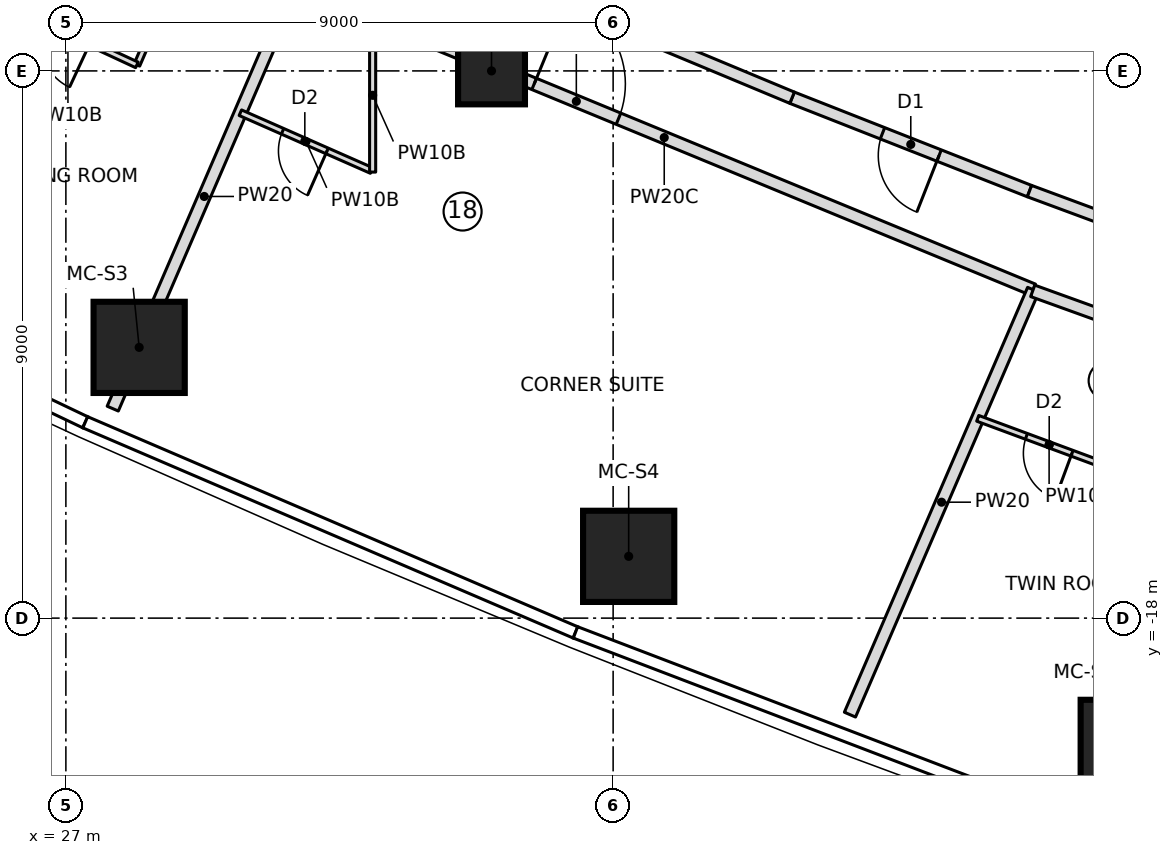
"""IFC4 building model, lengths in metres.
Left out: names, types, materials, properties, quantities, classifications, styles, units other than length and angle.
Written with IfcOpenShell. Run it as: python <this file> out.ifc"""

import sys

from ifc_helpers import new_model, si_unit, direction, frame, frame_2d, origin, origin_2d, place, context, subcontext, project, spatial, rectangle, extrude, element, fill, save


model = new_model("IFC4")
c1 = context("Model", 3, precision=1e-05, world=origin(), true_north=direction((0.0, 1.0)))
c2 = subcontext(c1, "Body", "Model", "MODEL_VIEW")
j1 = project(units=[si_unit("LENGTHUNIT", "METRE"), si_unit("PLANEANGLEUNIT", "RADIAN")], contexts=[c1])
p1 = place(None, origin())
s1 = spatial("IfcSite", under=j1, at=p1, CompositionType="ELEMENT")
p2 = place(p1, origin())
s2 = spatial("IfcBuilding", under=s1, at=p2, CompositionType="ELEMENT")
p3 = place(p2, frame((0.0, 0.0, 130.2)))
s3 = spatial("IfcBuildingStorey", under=s2, at=p3, CompositionType="ELEMENT", Elevation=130.2)
for number, where, z_axis, x_axis in (
    (1, (28.205, -13.547, 0.0), (0.0, 0.0, 1.0), (1.0, 0.0, 0.0)),
    (2, (36.256, -16.984, 0.0), (0.0, 0.0, 1.0), (1.0, 0.0, 0.0)),
    (3, (44.438, -20.093, 0.0), (0.0, 0.0, 1.0), (1.0, 0.0, 0.0)),
):
    element("IfcColumn", number, at=place(p3, frame(where, z_axis=z_axis, x_axis=x_axis)), inside=s3, PredefinedType="COLUMN", context=c2, shape_type="SweptSolid", body=[
        extrude(rectangle(XDim=1.5, YDim=1.5, at=origin_2d()), origin(), (0.0, 0.0, 1.0), 3.55),
    ])
p4 = place(p3, frame((34.0, -9.0, 0.0), z_axis=(0.0, 0.0, 1.0), x_axis=(1.0, 0.0, 0.0)))
e4 = element("IfcColumn", 4, at=p4, inside=s3, PredefinedType="COLUMN", context=c2, shape_type="SweptSolid", body=[
    extrude(rectangle(XDim=1.1, YDim=1.1, at=origin_2d()), origin(), (0.0, 0.0, 1.0), 3.55),
])
p5 = place(p3, frame((23.801, -12.716, 0.0), z_axis=(0.0, 0.0, 1.0), x_axis=(0.395995556294, 0.918252426839, 0.0)))
e5 = element("IfcWall", 5, at=p5, inside=s3, PredefinedType="PARTITIONING", context=c2, shape_type="SweptSolid", body=[
    extrude(rectangle(XDim=7.603, YDim=0.2, at=frame_2d((3.802, 0.0))), origin(), (0.0, 0.0, 1.0), 3.25),
])
p6 = place(p3, frame((29.07, -6.81, 0.0), z_axis=(0.0, 0.0, 1.0), x_axis=(-0.396000751487, -0.918250186399, 0.0)))
e6 = element("IfcWall", 6, at=p6, inside=s3, PredefinedType="PARTITIONING", context=c2, shape_type="SweptSolid", body=[
    extrude(rectangle(XDim=2.278, YDim=0.1, at=frame_2d((1.139, 0.0))), origin(), (0.0, 0.0, 1.0), 3.25),
])
p7 = place(p3, frame((28.168, -8.902, 0.0), z_axis=(0.0, 0.0, 1.0), x_axis=(-0.906813113059, 0.421532890751, 0.0)))
e7 = element("IfcWall", 7, at=p7, inside=s3, PredefinedType="PARTITIONING", context=c2, shape_type="SweptSolid", body=[
    extrude(rectangle(XDim=2.501, YDim=0.1, at=frame_2d((1.25, 0.0))), origin(), (0.0, 0.0, 1.0), 3.25),
])
p8 = place(p7, frame((0.85, 0.0, 0.0)))
e8 = element("IfcOpeningElement", 8, at=p8, cuts=e7, PredefinedType="OPENING", context=c2, shape_type="SweptSolid", body=[
    extrude(rectangle(XDim=0.8, YDim=2.1, at=frame_2d((0.4, 1.05))), frame((0.0, 0.06, 0.0), z_axis=(0.0, -1.0, 0.0), x_axis=(1.0, 0.0, 0.0)), (0.0, 0.0, 1.0), 0.12),
])
p9 = place(p3, frame((27.771, -14.554, 0.0), z_axis=(0.0, 0.0, 1.0), x_axis=(0.396004020147, 0.918248776763, 0.0)))
e9 = element("IfcWall", 9, at=p9, inside=s3, PredefinedType="PARTITIONING", context=c2, shape_type="SweptSolid", body=[
    extrude(rectangle(XDim=7.6, YDim=0.2, at=frame_2d((3.8, 0.0))), origin(), (0.0, 0.0, 1.0), 3.25),
])
p10 = place(p3, frame((30.772, -7.594, 0.0), z_axis=(0.0, 0.0, 1.0), x_axis=(0.924461873383, -0.381274500407, 0.0)))
e10 = element("IfcWall", 10, at=p10, inside=s3, PredefinedType="PARTITIONING", context=c2, shape_type="SweptSolid", body=[
    extrude(rectangle(XDim=13.127, YDim=0.2, at=frame_2d((6.564, 0.0))), origin(), (0.0, 0.0, 1.0), 3.25),
])
p11 = place(p10, frame((4.25, 0.0, 0.0)))
e11 = element("IfcOpeningElement", 11, at=p11, cuts=e10, PredefinedType="OPENING", context=c2, shape_type="SweptSolid", body=[
    extrude(rectangle(XDim=1.5, YDim=2.1, at=frame_2d((0.75, 1.05))), frame((0.0, 0.11, 0.0), z_axis=(0.0, -1.0, 0.0), x_axis=(1.0, 0.0, 0.0)), (0.0, 0.0, 1.0), 0.22),
])
p12 = place(p3, frame((32.028, -10.638, 0.0), z_axis=(0.0, 0.0, 1.0), x_axis=(-0.915108845766, 0.403206895278, 0.0)))
e12 = element("IfcWall", 12, at=p12, inside=s3, PredefinedType="PARTITIONING", context=c2, shape_type="SweptSolid", body=[
    extrude(rectangle(XDim=2.358, YDim=0.1, at=frame_2d((1.179, 0.0))), origin(), (0.0, 0.0, 1.0), 3.25),
])
p13 = place(p12, frame((0.8, 0.0, 0.0)))
e13 = element("IfcOpeningElement", 13, at=p13, cuts=e12, PredefinedType="OPENING", context=c2, shape_type="SweptSolid", body=[
    extrude(rectangle(XDim=0.8, YDim=2.1, at=frame_2d((0.4, 1.05))), frame((0.0, 0.06, 0.0), z_axis=(0.0, -1.0, 0.0), x_axis=(1.0, 0.0, 0.0)), (0.0, 0.0, 1.0), 0.12),
])
p14 = place(p3, frame((39.895, -19.587, 0.0), z_axis=(0.0, 0.0, 1.0), x_axis=(0.395993528256, 0.918253301426, 0.0)))
e14 = element("IfcWall", 14, at=p14, inside=s3, PredefinedType="PARTITIONING", context=c2, shape_type="SweptSolid", body=[
    extrude(rectangle(XDim=7.61, YDim=0.2, at=frame_2d((3.805, 0.0))), origin(), (0.0, 0.0, 1.0), 3.25),
])
p15 = place(p3, frame((42.9, -12.617, 0.0), z_axis=(0.0, 0.0, 1.0), x_axis=(0.940555877924, -0.339638985546, 0.0)))
e15 = element("IfcWall", 15, at=p15, inside=s3, PredefinedType="PARTITIONING", context=c2, shape_type="SweptSolid", body=[
    extrude(rectangle(XDim=4.381, YDim=0.2, at=frame_2d((2.19, 0.0))), origin(), (0.0, 0.0, 1.0), 3.25),
])
p16 = place(p15, frame((3.05, 0.0, 0.0)))
e16 = element("IfcOpeningElement", 16, at=p16, cuts=e15, PredefinedType="OPENING", context=c2, shape_type="SweptSolid", body=[
    extrude(rectangle(XDim=1.0, YDim=2.1, at=frame_2d((0.5, 1.05))), frame((0.0, 0.11, 0.0), z_axis=(0.0, -1.0, 0.0), x_axis=(1.0, 0.0, 0.0)), (0.0, 0.0, 1.0), 0.22),
])
p17 = place(p3, frame((44.344, -15.583, 0.0), z_axis=(0.0, 0.0, 1.0), x_axis=(-0.937752290113, 0.347304826323, 0.0)))
e17 = element("IfcWall", 17, at=p17, inside=s3, PredefinedType="PARTITIONING", context=c2, shape_type="SweptSolid", body=[
    extrude(rectangle(XDim=2.503, YDim=0.1, at=frame_2d((1.251, 0.0))), origin(), (0.0, 0.0, 1.0), 3.25),
])
p18 = place(p17, frame((0.85, 0.0, 0.0)))
e18 = element("IfcOpeningElement", 18, at=p18, cuts=e17, PredefinedType="OPENING", context=c2, shape_type="SweptSolid", body=[
    extrude(rectangle(XDim=0.8, YDim=2.1, at=frame_2d((0.4, 1.05))), frame((0.0, 0.06, 0.0), z_axis=(0.0, -1.0, 0.0), x_axis=(1.0, 0.0, 0.0)), (0.0, 0.0, 1.0), 0.12),
])
p19 = place(p3, frame((42.847, -10.977, 0.0), z_axis=(0.0, 0.0, 1.0), x_axis=(-0.930576677263, 0.36609704688, 0.0)))
e19 = element("IfcWall", 19, at=p19, inside=s3, PredefinedType="PARTITIONING", context=c2, shape_type="SweptSolid", body=[
    extrude(rectangle(XDim=4.195, YDim=0.2, at=frame_2d((2.098, 0.0))), origin(), (0.0, 0.0, 1.0), 3.25),
])
p20 = place(p19, frame((1.598, 0.0, 0.0)))
e20 = element("IfcOpeningElement", 20, at=p20, cuts=e19, PredefinedType="OPENING", context=c2, shape_type="SweptSolid", body=[
    extrude(rectangle(XDim=1.0, YDim=2.1, at=frame_2d((0.5, 1.05))), frame((0.0, 0.11, 0.0), z_axis=(0.0, -1.0, 0.0), x_axis=(1.0, 0.0, 0.0)), (0.0, 0.0, 1.0), 0.22),
])
p21 = place(p3, frame((46.781, -12.434, 0.0), z_axis=(0.0, 0.0, 1.0), x_axis=(-0.937732614305, 0.347357948044, 0.0)))
e21 = element("IfcWall", 21, at=p21, inside=s3, PredefinedType="PARTITIONING", context=c2, shape_type="SweptSolid", body=[
    extrude(rectangle(XDim=4.195, YDim=0.2, at=frame_2d((2.098, 0.0))), origin(), (0.0, 0.0, 1.0), 3.25),
])
p22 = place(p3, frame((38.943, -9.441, 0.0), z_axis=(0.0, 0.0, 1.0), x_axis=(-0.923008963065, 0.384778448073, 0.0)))
e22 = element("IfcWall", 22, at=p22, inside=s3, PredefinedType="PARTITIONING", context=c2, shape_type="SweptSolid", body=[
    extrude(rectangle(XDim=2.339, YDim=0.2, at=frame_2d((1.169, 0.0))), origin(), (0.0, 0.0, 1.0), 3.25),
])
p23 = place(p3, frame((32.045, -8.138, 0.0), z_axis=(0.0, 0.0, 1.0), x_axis=(0.0, -1.0, 0.0)))
e23 = element("IfcWall", 23, at=p23, inside=s3, PredefinedType="PARTITIONING", context=c2, shape_type="SweptSolid", body=[
    extrude(rectangle(XDim=2.526, YDim=0.1, at=frame_2d((1.263, 0.0))), origin(), (0.0, 0.0, 1.0), 3.25),
])
p24 = place(p13, origin())
e24 = element("IfcDoor", 24, at=p24, inside=s3, OperationType="SINGLE_SWING_LEFT", PredefinedType="DOOR", context=c2, shape_type="SweptSolid", body=[
    extrude(rectangle(XDim=0.8, YDim=2.1, at=frame_2d((0.4, 1.05))), frame((0.0, 0.025, 0.0), z_axis=(0.0, -1.0, 0.0), x_axis=(1.0, 0.0, 0.0)), (0.0, 0.0, 1.0), 0.05),
])
fill(e13, e24)
p25 = place(p11, origin())
e25 = element("IfcDoor", 25, at=p25, inside=s3, OperationType="DOUBLE_DOOR_SINGLE_SWING", PredefinedType="DOOR", context=c2, shape_type="SweptSolid", body=[
    extrude(rectangle(XDim=1.5, YDim=2.1, at=frame_2d((0.75, 1.05))), frame((0.0, 0.025, 0.0), z_axis=(0.0, -1.0, 0.0), x_axis=(1.0, 0.0, 0.0)), (0.0, 0.0, 1.0), 0.05),
])
fill(e11, e25)
p26 = place(p18, origin())
e26 = element("IfcDoor", 26, at=p26, inside=s3, OperationType="SINGLE_SWING_LEFT", PredefinedType="DOOR", context=c2, shape_type="SweptSolid", body=[
    extrude(rectangle(XDim=0.8, YDim=2.1, at=frame_2d((0.4, 1.05))), frame((0.0, 0.025, 0.0), z_axis=(0.0, -1.0, 0.0), x_axis=(1.0, 0.0, 0.0)), (0.0, 0.0, 1.0), 0.05),
])
fill(e18, e26)
p27 = place(p20, origin())
e27 = element("IfcDoor", 27, at=p27, inside=s3, OperationType="SINGLE_SWING_LEFT", PredefinedType="DOOR", context=c2, shape_type="SweptSolid", body=[
    extrude(rectangle(XDim=1.0, YDim=2.1, at=frame_2d((0.5, 1.05))), frame((0.0, 0.025, 0.0), z_axis=(0.0, -1.0, 0.0), x_axis=(1.0, 0.0, 0.0)), (0.0, 0.0, 1.0), 0.05),
])
fill(e20, e27)
save(model, sys.argv[1])
